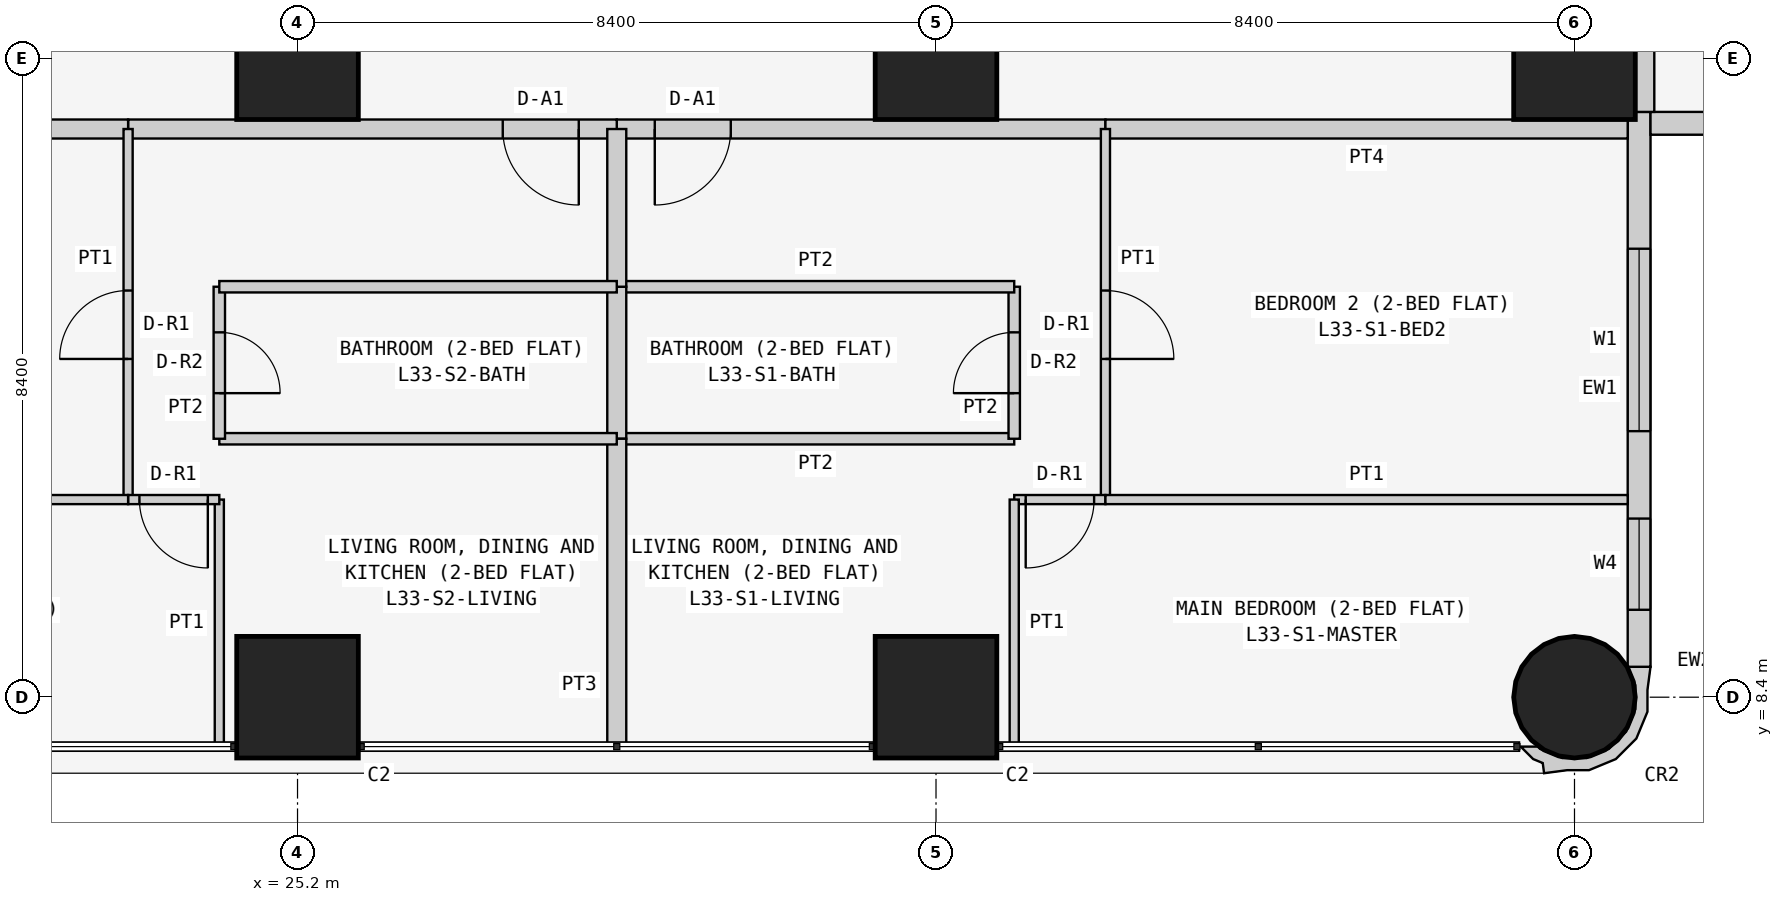
"""IFC4 building model, lengths in metres.
Left out: names, types, materials, properties, quantities, classifications, styles, units other than length and angle.
Written with IfcOpenShell. Run it as: python <this file> out.ifc"""

import sys

from ifc_helpers import new_model, si_unit, direction, frame, frame_2d, origin, origin_2d, place, context, subcontext, project, spatial, polyline, rectangle, circle, outline, extrude, element, fill, save


model = new_model("IFC4")
c1 = context("Model", 3, precision=1e-05, world=origin(), true_north=direction((0.0, 1.0)))
c2 = subcontext(c1, "Body", "Model", "MODEL_VIEW")
j1 = project(units=[si_unit("LENGTHUNIT", "METRE"), si_unit("PLANEANGLEUNIT", "RADIAN")], contexts=[c1])
p1 = place(None, origin())
s1 = spatial("IfcSite", under=j1, at=p1, CompositionType="ELEMENT")
p2 = place(p1, origin())
s2 = spatial("IfcBuilding", under=s1, at=p2, CompositionType="ELEMENT")
p3 = place(p2, frame((0.0, 0.0, 130.5)))
s3 = spatial("IfcBuildingStorey", under=s2, at=p3, CompositionType="ELEMENT", Elevation=130.5)
for number, where, z_axis, x_axis in (
    (1, (25.2, 8.4, 0.0), (0.0, 0.0, 1.0), (1.0, 0.0, 0.0)),
    (2, (25.2, 16.8, 0.0), (0.0, 0.0, 1.0), (1.0, 0.0, 0.0)),
    (3, (33.6, 8.4, 0.0), (0.0, 0.0, 1.0), (1.0, 0.0, 0.0)),
    (4, (33.6, 16.8, 0.0), (0.0, 0.0, 1.0), (1.0, 0.0, 0.0)),
):
    element("IfcColumn", number, at=place(p3, frame(where, z_axis=z_axis, x_axis=x_axis)), inside=s3, PredefinedType="COLUMN", context=c2, shape_type="SweptSolid", body=[
        extrude(rectangle(XDim=1.6, YDim=1.6, at=origin_2d()), origin(), (0.0, 0.0, 1.0), 3.6),
    ])
p4 = place(p3, frame((42.0, 8.4, 0.0), z_axis=(0.0, 0.0, 1.0), x_axis=(1.0, 0.0, 0.0)))
e5 = element("IfcColumn", 5, at=p4, inside=s3, PredefinedType="COLUMN", context=c2, shape_type="SweptSolid", body=[
    extrude(circle(Radius=0.8, at=origin_2d()), origin(), (0.0, 0.0, 1.0), 3.6),
])
p5 = place(p3, frame((42.0, 16.8, 0.0), z_axis=(0.0, 0.0, 1.0), x_axis=(1.0, 0.0, 0.0)))
e6 = element("IfcColumn", 6, at=p5, inside=s3, PredefinedType="COLUMN", context=c2, shape_type="SweptSolid", body=[
    extrude(rectangle(XDim=1.6, YDim=1.6, at=origin_2d()), origin(), (0.0, 0.0, 1.0), 3.6),
])
p6 = place(p3, frame((42.85, 8.8, 0.0), z_axis=(0.0, 0.0, 1.0), x_axis=(0.0, 1.0, 0.0)))
e7 = element("IfcWall", 7, at=p6, inside=s3, PredefinedType="SOLIDWALL", context=c2, shape_type="SweptSolid", body=[
    extrude(rectangle(XDim=7.3, YDim=0.3, at=frame_2d((3.65, 0.0))), origin(), (0.0, 0.0, 1.0), 3.45),
])
p7 = place(p6, frame((3.1, 0.0, 0.9)))
e8 = element("IfcOpeningElement", 8, at=p7, cuts=e7, PredefinedType="OPENING", context=c2, shape_type="SweptSolid", body=[
    extrude(rectangle(XDim=2.4, YDim=1.5, at=frame_2d((1.2, 0.75))), frame((0.0, 0.16, 0.0), z_axis=(0.0, -1.0, 0.0), x_axis=(1.0, 0.0, 0.0)), (0.0, 0.0, 1.0), 0.32),
])
p8 = place(p6, frame((0.75, 0.0, 0.9)))
e9 = element("IfcOpeningElement", 9, at=p8, cuts=e7, PredefinedType="OPENING", context=c2, shape_type="SweptSolid", body=[
    extrude(rectangle(XDim=1.2, YDim=1.5, at=frame_2d((0.6, 0.75))), frame((0.0, 0.16, 0.0), z_axis=(0.0, -1.0, 0.0), x_axis=(1.0, 0.0, 0.0)), (0.0, 0.0, 1.0), 0.32),
])
p9 = place(p3, frame((43.0, 15.95, 0.0), z_axis=(0.0, 0.0, 1.0), x_axis=(1.0, 0.0, 0.0)))
e10 = element("IfcWall", 10, at=p9, inside=s3, PredefinedType="SOLIDWALL", context=c2, shape_type="SweptSolid", body=[
    extrude(rectangle(XDim=15.4, YDim=0.3, at=frame_2d((7.7, 0.0))), origin(), (0.0, 0.0, 1.0), 3.45),
])
p10 = place(p9, frame((1.2, 0.0, 0.9)))
e11 = element("IfcOpeningElement", 11, at=p10, cuts=e10, PredefinedType="OPENING", context=c2, shape_type="SweptSolid", body=[
    extrude(rectangle(XDim=1.8, YDim=1.5, at=frame_2d((0.9, 0.75))), frame((0.0, 0.16, 0.0), z_axis=(0.0, -1.0, 0.0), x_axis=(1.0, 0.0, 0.0)), (0.0, 0.0, 1.0), 0.32),
])
p11 = place(p9, frame((4.95, 0.0, 1.5)))
e12 = element("IfcOpeningElement", 12, at=p11, cuts=e10, PredefinedType="OPENING", context=c2, shape_type="SweptSolid", body=[
    extrude(rectangle(XDim=0.9, YDim=0.7, at=frame_2d((0.45, 0.35))), frame((0.0, 0.16, 0.0), z_axis=(0.0, -1.0, 0.0), x_axis=(1.0, 0.0, 0.0)), (0.0, 0.0, 1.0), 0.32),
])
p12 = place(p9, frame((8.5, 0.0, 0.9)))
e13 = element("IfcOpeningElement", 13, at=p12, cuts=e10, PredefinedType="OPENING", context=c2, shape_type="SweptSolid", body=[
    extrude(rectangle(XDim=1.8, YDim=1.5, at=frame_2d((0.9, 0.75))), frame((0.0, 0.16, 0.0), z_axis=(0.0, -1.0, 0.0), x_axis=(1.0, 0.0, 0.0)), (0.0, 0.0, 1.0), 0.32),
])
p13 = place(p9, frame((12.5, 0.0, 0.0)))
e14 = element("IfcOpeningElement", 14, at=p13, cuts=e10, PredefinedType="OPENING", context=c2, shape_type="SweptSolid", body=[
    extrude(rectangle(XDim=0.9, YDim=2.4, at=frame_2d((0.45, 1.2))), frame((0.0, 0.16, 0.0), z_axis=(0.0, -1.0, 0.0), x_axis=(1.0, 0.0, 0.0)), (0.0, 0.0, 1.0), 0.32),
])
p14 = place(p9, frame((13.5, 0.0, 0.9)))
e15 = element("IfcOpeningElement", 15, at=p14, cuts=e10, PredefinedType="OPENING", context=c2, shape_type="SweptSolid", body=[
    extrude(rectangle(XDim=1.2, YDim=1.5, at=frame_2d((0.6, 0.75))), frame((0.0, 0.16, 0.0), z_axis=(0.0, -1.0, 0.0), x_axis=(1.0, 0.0, 0.0)), (0.0, 0.0, 1.0), 0.32),
])
p15 = place(p3, frame((41.352, 7.805, 0.0), z_axis=(0.0, 0.0, 1.0), x_axis=(0.343276641956, -0.93923434088, 0.0)))
e16 = element("IfcWall", 16, at=p15, inside=s3, PredefinedType="SOLIDWALL", context=c2, shape_type="SweptSolid", body=[
    extrude(outline(polyline([(-0.369, 1.89), (-0.509, 1.621), (-0.49, 1.615), (-0.479, 1.609), (-0.211, 1.62), (0.088, 1.511), (0.323, 1.295), (0.457, 1.006), (0.47, 0.688), (0.361, 0.389), (0.145, 0.154), (0.108, 0.136), (0.031, -0.075), (0.241, 0.023), (0.333, 0.124), (0.465, 0.094), (0.532, 0.393), (0.631, 0.663), (0.614, 1.044), (0.453, 1.391), (0.172, 1.649), (-0.097, 1.748), (-0.369, 1.89)])), origin(), (0.0, 0.0, 1.0), 3.45),
])
p16 = place(p3, frame((42.925, 22.971, 0.0), z_axis=(0.0, 0.0, 1.0), x_axis=(0.0, -1.0, 0.0)))
e17 = element("IfcWall", 17, at=p16, inside=s3, PredefinedType="PARTITIONING", context=c2, shape_type="SweptSolid", body=[
    extrude(rectangle(XDim=6.871, YDim=0.25, at=frame_2d((3.436, 0.0))), origin(), (0.0, 0.0, 1.0), 3.45),
])
p17 = place(p3, frame((35.829, 15.875, 0.0), z_axis=(0.0, 0.0, 1.0), x_axis=(-1.0, 0.0, 0.0)))
e18 = element("IfcWall", 18, at=p17, inside=s3, PredefinedType="PARTITIONING", context=c2, shape_type="SweptSolid", body=[
    extrude(rectangle(XDim=6.429, YDim=0.25, at=frame_2d((3.215, 0.0))), origin(), (0.0, 0.0, 1.0), 3.45),
])
p18 = place(p17, frame((4.929, 0.0, 0.0)))
e19 = element("IfcOpeningElement", 19, at=p18, cuts=e18, PredefinedType="OPENING", context=c2, shape_type="SweptSolid", body=[
    extrude(rectangle(XDim=1.0, YDim=2.1, at=frame_2d((0.5, 1.05))), frame((0.0, 0.135, 0.0), z_axis=(0.0, -1.0, 0.0), x_axis=(1.0, 0.0, 0.0)), (0.0, 0.0, 1.0), 0.27),
])
p19 = place(p3, frame((42.7, 15.875, 0.0), z_axis=(0.0, 0.0, 1.0), x_axis=(-1.0, 0.0, 0.0)))
e20 = element("IfcWall", 20, at=p19, inside=s3, PredefinedType="PARTITIONING", context=c2, shape_type="SweptSolid", body=[
    extrude(rectangle(XDim=6.871, YDim=0.25, at=frame_2d((3.436, 0.0))), origin(), (0.0, 0.0, 1.0), 3.45),
])
p20 = place(p3, frame((29.4, 15.875, 0.0), z_axis=(0.0, 0.0, 1.0), x_axis=(-1.0, 0.0, 0.0)))
e21 = element("IfcWall", 21, at=p20, inside=s3, PredefinedType="PARTITIONING", context=c2, shape_type="SweptSolid", body=[
    extrude(rectangle(XDim=6.429, YDim=0.25, at=frame_2d((3.214, 0.0))), origin(), (0.0, 0.0, 1.0), 3.45),
])
p21 = place(p20, frame((0.5, 0.0, 0.0)))
e22 = element("IfcOpeningElement", 22, at=p21, cuts=e21, PredefinedType="OPENING", context=c2, shape_type="SweptSolid", body=[
    extrude(rectangle(XDim=1.0, YDim=2.1, at=frame_2d((0.5, 1.05))), frame((0.0, 0.135, 0.0), z_axis=(0.0, -1.0, 0.0), x_axis=(1.0, 0.0, 0.0)), (0.0, 0.0, 1.0), 0.27),
])
p22 = place(p3, frame((22.971, 15.875, 0.0), z_axis=(0.0, 0.0, 1.0), x_axis=(-1.0, 0.0, 0.0)))
e23 = element("IfcWall", 23, at=p22, inside=s3, PredefinedType="PARTITIONING", context=c2, shape_type="SweptSolid", body=[
    extrude(rectangle(XDim=6.871, YDim=0.25, at=frame_2d((3.436, 0.0))), origin(), (0.0, 0.0, 1.0), 3.45),
])
p23 = place(p3, frame((29.4, 11.8, 0.0), z_axis=(0.0, 0.0, 1.0), x_axis=(1.0, 0.0, 0.0)))
e24 = element("IfcWall", 24, at=p23, inside=s3, PredefinedType="PARTITIONING", context=c2, shape_type="SweptSolid", body=[
    extrude(rectangle(XDim=5.229, YDim=0.15, at=frame_2d((2.615, 0.0))), origin(), (0.0, 0.0, 1.0), 3.45),
])
p24 = place(p3, frame((34.629, 11.8, 0.0), z_axis=(0.0, 0.0, 1.0), x_axis=(0.0, 1.0, 0.0)))
e25 = element("IfcWall", 25, at=p24, inside=s3, PredefinedType="PARTITIONING", context=c2, shape_type="SweptSolid", body=[
    extrude(rectangle(XDim=2.0, YDim=0.15, at=frame_2d((1.0, 0.0))), origin(), (0.0, 0.0, 1.0), 3.45),
])
p25 = place(p24, frame((0.6, 0.0, 0.0)))
e26 = element("IfcOpeningElement", 26, at=p25, cuts=e25, PredefinedType="OPENING", context=c2, shape_type="SweptSolid", body=[
    extrude(rectangle(XDim=0.8, YDim=2.1, at=frame_2d((0.4, 1.05))), frame((0.0, 0.085, 0.0), z_axis=(0.0, -1.0, 0.0), x_axis=(1.0, 0.0, 0.0)), (0.0, 0.0, 1.0), 0.17),
])
p26 = place(p3, frame((34.629, 13.8, 0.0), z_axis=(0.0, 0.0, 1.0), x_axis=(-1.0, 0.0, 0.0)))
e27 = element("IfcWall", 27, at=p26, inside=s3, PredefinedType="PARTITIONING", context=c2, shape_type="SweptSolid", body=[
    extrude(rectangle(XDim=5.229, YDim=0.15, at=frame_2d((2.615, 0.0))), origin(), (0.0, 0.0, 1.0), 3.45),
])
p27 = place(p3, frame((29.4, 13.8, 0.0), z_axis=(0.0, 0.0, 1.0), x_axis=(0.0, -1.0, 0.0)))
e28 = element("IfcWall", 28, at=p27, inside=s3, PredefinedType="PARTITIONING", context=c2, shape_type="SweptSolid", body=[
    extrude(rectangle(XDim=2.0, YDim=0.25, at=frame_2d((1.0, 0.0))), origin(), (0.0, 0.0, 1.0), 2.848),
])
p28 = place(p3, frame((35.829, 15.875, 0.0), z_axis=(0.0, 0.0, 1.0), x_axis=(0.0, -1.0, 0.0)))
e29 = element("IfcWall", 29, at=p28, inside=s3, PredefinedType="PARTITIONING", context=c2, shape_type="SweptSolid", body=[
    extrude(rectangle(XDim=4.875, YDim=0.12, at=frame_2d((2.438, 0.0))), origin(), (0.0, 0.0, 1.0), 3.45),
])
p29 = place(p28, frame((2.125, 0.0, 0.0)))
e30 = element("IfcOpeningElement", 30, at=p29, cuts=e29, PredefinedType="OPENING", context=c2, shape_type="SweptSolid", body=[
    extrude(rectangle(XDim=0.9, YDim=2.1, at=frame_2d((0.45, 1.05))), frame((0.0, 0.07, 0.0), z_axis=(0.0, -1.0, 0.0), x_axis=(1.0, 0.0, 0.0)), (0.0, 0.0, 1.0), 0.14),
])
p30 = place(p3, frame((35.829, 11.0, 0.0), z_axis=(0.0, 0.0, 1.0), x_axis=(-1.0, 0.0, 0.0)))
e31 = element("IfcWall", 31, at=p30, inside=s3, PredefinedType="PARTITIONING", context=c2, shape_type="SweptSolid", body=[
    extrude(rectangle(XDim=1.2, YDim=0.12, at=frame_2d((0.6, 0.0))), origin(), (0.0, 0.0, 1.0), 3.45),
])
p31 = place(p30, frame((0.149, 0.0, 0.0)))
e32 = element("IfcOpeningElement", 32, at=p31, cuts=e31, PredefinedType="OPENING", context=c2, shape_type="SweptSolid", body=[
    extrude(rectangle(XDim=0.9, YDim=2.1, at=frame_2d((0.45, 1.05))), frame((0.0, 0.07, 0.0), z_axis=(0.0, -1.0, 0.0), x_axis=(1.0, 0.0, 0.0)), (0.0, 0.0, 1.0), 0.14),
])
p32 = place(p3, frame((34.629, 11.0, 0.0), z_axis=(0.0, 0.0, 1.0), x_axis=(0.0, -1.0, 0.0)))
e33 = element("IfcWall", 33, at=p32, inside=s3, PredefinedType="PARTITIONING", context=c2, shape_type="SweptSolid", body=[
    extrude(rectangle(XDim=3.25, YDim=0.12, at=frame_2d((1.625, 0.0))), origin(), (0.0, 0.0, 1.0), 3.45),
])
p33 = place(p3, frame((29.4, 7.75, 0.0), z_axis=(0.0, 0.0, 1.0), x_axis=(0.0, 1.0, 0.0)))
e34 = element("IfcWall", 34, at=p33, inside=s3, PredefinedType="PARTITIONING", context=c2, shape_type="SweptSolid", body=[
    extrude(rectangle(XDim=4.05, YDim=0.25, at=frame_2d((2.025, 0.0))), origin(), (0.0, 0.0, 1.0), 2.848),
])
p34 = place(p3, frame((29.4, 13.8, 0.0), z_axis=(0.0, 0.0, 1.0), x_axis=(0.0, 1.0, 0.0)))
e35 = element("IfcWall", 35, at=p34, inside=s3, PredefinedType="PARTITIONING", context=c2, shape_type="SweptSolid", body=[
    extrude(rectangle(XDim=2.075, YDim=0.25, at=frame_2d((1.038, 0.0))), origin(), (0.0, 0.0, 1.0), 2.848),
])
p35 = place(p3, frame((35.829, 11.0, 0.0), z_axis=(0.0, 0.0, 1.0), x_axis=(1.0, 0.0, 0.0)))
e36 = element("IfcWall", 36, at=p35, inside=s3, PredefinedType="PARTITIONING", context=c2, shape_type="SweptSolid", body=[
    extrude(rectangle(XDim=6.871, YDim=0.12, at=frame_2d((3.436, 0.0))), origin(), (0.0, 0.0, 1.0), 3.45),
])
p36 = place(p3, frame((29.4, 11.8, 0.0), z_axis=(0.0, 0.0, 1.0), x_axis=(-1.0, 0.0, 0.0)))
e37 = element("IfcWall", 37, at=p36, inside=s3, PredefinedType="PARTITIONING", context=c2, shape_type="SweptSolid", body=[
    extrude(rectangle(XDim=5.229, YDim=0.15, at=frame_2d((2.615, 0.0))), origin(), (0.0, 0.0, 1.0), 3.45),
])
p37 = place(p3, frame((24.171, 11.8, 0.0), z_axis=(0.0, 0.0, 1.0), x_axis=(0.0, 1.0, 0.0)))
e38 = element("IfcWall", 38, at=p37, inside=s3, PredefinedType="PARTITIONING", context=c2, shape_type="SweptSolid", body=[
    extrude(rectangle(XDim=2.0, YDim=0.15, at=frame_2d((1.0, 0.0))), origin(), (0.0, 0.0, 1.0), 3.45),
])
p38 = place(p37, frame((0.6, 0.0, 0.0)))
e39 = element("IfcOpeningElement", 39, at=p38, cuts=e38, PredefinedType="OPENING", context=c2, shape_type="SweptSolid", body=[
    extrude(rectangle(XDim=0.8, YDim=2.1, at=frame_2d((0.4, 1.05))), frame((0.0, 0.085, 0.0), z_axis=(0.0, -1.0, 0.0), x_axis=(1.0, 0.0, 0.0)), (0.0, 0.0, 1.0), 0.17),
])
p39 = place(p3, frame((24.171, 13.8, 0.0), z_axis=(0.0, 0.0, 1.0), x_axis=(1.0, 0.0, 0.0)))
e40 = element("IfcWall", 40, at=p39, inside=s3, PredefinedType="PARTITIONING", context=c2, shape_type="SweptSolid", body=[
    extrude(rectangle(XDim=5.229, YDim=0.15, at=frame_2d((2.615, 0.0))), origin(), (0.0, 0.0, 1.0), 3.45),
])
p40 = place(p3, frame((22.971, 11.0, 0.0), z_axis=(0.0, 0.0, 1.0), x_axis=(0.0, 1.0, 0.0)))
e41 = element("IfcWall", 41, at=p40, inside=s3, PredefinedType="PARTITIONING", context=c2, shape_type="SweptSolid", body=[
    extrude(rectangle(XDim=4.875, YDim=0.12, at=frame_2d((2.438, 0.0))), origin(), (0.0, 0.0, 1.0), 3.45),
])
p41 = place(p40, frame((1.85, 0.0, 0.0)))
e42 = element("IfcOpeningElement", 42, at=p41, cuts=e41, PredefinedType="OPENING", context=c2, shape_type="SweptSolid", body=[
    extrude(rectangle(XDim=0.9, YDim=2.1, at=frame_2d((0.45, 1.05))), frame((0.0, 0.07, 0.0), z_axis=(0.0, -1.0, 0.0), x_axis=(1.0, 0.0, 0.0)), (0.0, 0.0, 1.0), 0.14),
])
p42 = place(p3, frame((24.171, 7.75, 0.0), z_axis=(0.0, 0.0, 1.0), x_axis=(0.0, 1.0, 0.0)))
e43 = element("IfcWall", 43, at=p42, inside=s3, PredefinedType="PARTITIONING", context=c2, shape_type="SweptSolid", body=[
    extrude(rectangle(XDim=3.25, YDim=0.12, at=frame_2d((1.625, 0.0))), origin(), (0.0, 0.0, 1.0), 3.45),
])
p43 = place(p3, frame((24.171, 11.0, 0.0), z_axis=(0.0, 0.0, 1.0), x_axis=(-1.0, 0.0, 0.0)))
e44 = element("IfcWall", 44, at=p43, inside=s3, PredefinedType="PARTITIONING", context=c2, shape_type="SweptSolid", body=[
    extrude(rectangle(XDim=1.2, YDim=0.12, at=frame_2d((0.6, 0.0))), origin(), (0.0, 0.0, 1.0), 3.45),
])
p44 = place(p43, frame((0.151, 0.0, 0.0)))
e45 = element("IfcOpeningElement", 45, at=p44, cuts=e44, PredefinedType="OPENING", context=c2, shape_type="SweptSolid", body=[
    extrude(rectangle(XDim=0.9, YDim=2.1, at=frame_2d((0.45, 1.05))), frame((0.0, 0.07, 0.0), z_axis=(0.0, -1.0, 0.0), x_axis=(1.0, 0.0, 0.0)), (0.0, 0.0, 1.0), 0.14),
])
p45 = place(p3, frame((22.971, 11.0, 0.0), z_axis=(0.0, 0.0, 1.0), x_axis=(-1.0, 0.0, 0.0)))
e46 = element("IfcWall", 46, at=p45, inside=s3, PredefinedType="PARTITIONING", context=c2, shape_type="SweptSolid", body=[
    extrude(rectangle(XDim=6.871, YDim=0.12, at=frame_2d((3.436, 0.0))), origin(), (0.0, 0.0, 1.0), 3.45),
])
p46 = place(p7, origin())
e47 = element("IfcWindow", 47, at=p46, inside=s3, PartitioningType="SINGLE_PANEL", PredefinedType="WINDOW", context=c2, shape_type="SweptSolid", body=[
    extrude(rectangle(XDim=2.4, YDim=1.5, at=frame_2d((1.2, 0.75))), frame((0.0, 0.03, 0.0), z_axis=(0.0, -1.0, 0.0), x_axis=(1.0, 0.0, 0.0)), (0.0, 0.0, 1.0), 0.06),
])
fill(e8, e47)
p47 = place(p8, origin())
e48 = element("IfcWindow", 48, at=p47, inside=s3, PartitioningType="SINGLE_PANEL", PredefinedType="WINDOW", context=c2, shape_type="SweptSolid", body=[
    extrude(rectangle(XDim=1.2, YDim=1.5, at=frame_2d((0.6, 0.75))), frame((0.0, 0.03, 0.0), z_axis=(0.0, -1.0, 0.0), x_axis=(1.0, 0.0, 0.0)), (0.0, 0.0, 1.0), 0.06),
])
fill(e9, e48)
p48 = place(p18, origin())
e49 = element("IfcDoor", 49, at=p48, inside=s3, OperationType="SINGLE_SWING_RIGHT", PredefinedType="DOOR", context=c2, shape_type="SweptSolid", body=[
    extrude(rectangle(XDim=1.0, YDim=2.1, at=frame_2d((0.5, 1.05))), frame((0.0, 0.025, 0.0), z_axis=(0.0, -1.0, 0.0), x_axis=(1.0, 0.0, 0.0)), (0.0, 0.0, 1.0), 0.05),
])
fill(e19, e49)
p49 = place(p25, origin())
e50 = element("IfcDoor", 50, at=p49, inside=s3, OperationType="SINGLE_SWING_LEFT", PredefinedType="DOOR", context=c2, shape_type="SweptSolid", body=[
    extrude(rectangle(XDim=0.8, YDim=2.1, at=frame_2d((0.4, 1.05))), frame((0.0, 0.025, 0.0), z_axis=(0.0, -1.0, 0.0), x_axis=(1.0, 0.0, 0.0)), (0.0, 0.0, 1.0), 0.05),
])
fill(e26, e50)
p50 = place(p29, origin())
e51 = element("IfcDoor", 51, at=p50, inside=s3, OperationType="SINGLE_SWING_RIGHT", PredefinedType="DOOR", context=c2, shape_type="SweptSolid", body=[
    extrude(rectangle(XDim=0.9, YDim=2.1, at=frame_2d((0.45, 1.05))), frame((0.0, 0.025, 0.0), z_axis=(0.0, -1.0, 0.0), x_axis=(1.0, 0.0, 0.0)), (0.0, 0.0, 1.0), 0.05),
])
fill(e30, e51)
p51 = place(p31, origin())
e52 = element("IfcDoor", 52, at=p51, inside=s3, OperationType="SINGLE_SWING_RIGHT", PredefinedType="DOOR", context=c2, shape_type="SweptSolid", body=[
    extrude(rectangle(XDim=0.9, YDim=2.1, at=frame_2d((0.45, 1.05))), frame((0.0, 0.025, 0.0), z_axis=(0.0, -1.0, 0.0), x_axis=(1.0, 0.0, 0.0)), (0.0, 0.0, 1.0), 0.05),
])
fill(e32, e52)
p52 = place(p21, origin())
e53 = element("IfcDoor", 53, at=p52, inside=s3, OperationType="SINGLE_SWING_LEFT", PredefinedType="DOOR", context=c2, shape_type="SweptSolid", body=[
    extrude(rectangle(XDim=1.0, YDim=2.1, at=frame_2d((0.5, 1.05))), frame((0.0, 0.025, 0.0), z_axis=(0.0, -1.0, 0.0), x_axis=(1.0, 0.0, 0.0)), (0.0, 0.0, 1.0), 0.05),
])
fill(e22, e53)
p53 = place(p38, frame((0.8, 0.0, 0.0), z_axis=(0.0, 0.0, 1.0), x_axis=(-1.0, 0.0, 0.0)))
e54 = element("IfcDoor", 54, at=p53, inside=s3, OperationType="SINGLE_SWING_RIGHT", PredefinedType="DOOR", context=c2, shape_type="SweptSolid", body=[
    extrude(rectangle(XDim=0.8, YDim=2.1, at=frame_2d((0.4, 1.05))), frame((0.0, 0.025, 0.0), z_axis=(0.0, -1.0, 0.0), x_axis=(1.0, 0.0, 0.0)), (0.0, 0.0, 1.0), 0.05),
])
fill(e39, e54)
p54 = place(p41, origin())
e55 = element("IfcDoor", 55, at=p54, inside=s3, OperationType="SINGLE_SWING_LEFT", PredefinedType="DOOR", context=c2, shape_type="SweptSolid", body=[
    extrude(rectangle(XDim=0.9, YDim=2.1, at=frame_2d((0.45, 1.05))), frame((0.0, 0.025, 0.0), z_axis=(0.0, -1.0, 0.0), x_axis=(1.0, 0.0, 0.0)), (0.0, 0.0, 1.0), 0.05),
])
fill(e42, e55)
p55 = place(p44, origin())
e56 = element("IfcDoor", 56, at=p55, inside=s3, OperationType="SINGLE_SWING_LEFT", PredefinedType="DOOR", context=c2, shape_type="SweptSolid", body=[
    extrude(rectangle(XDim=0.9, YDim=2.1, at=frame_2d((0.45, 1.05))), frame((0.0, 0.025, 0.0), z_axis=(0.0, -1.0, 0.0), x_axis=(1.0, 0.0, 0.0)), (0.0, 0.0, 1.0), 0.05),
])
fill(e45, e56)
save(model, sys.argv[1])
